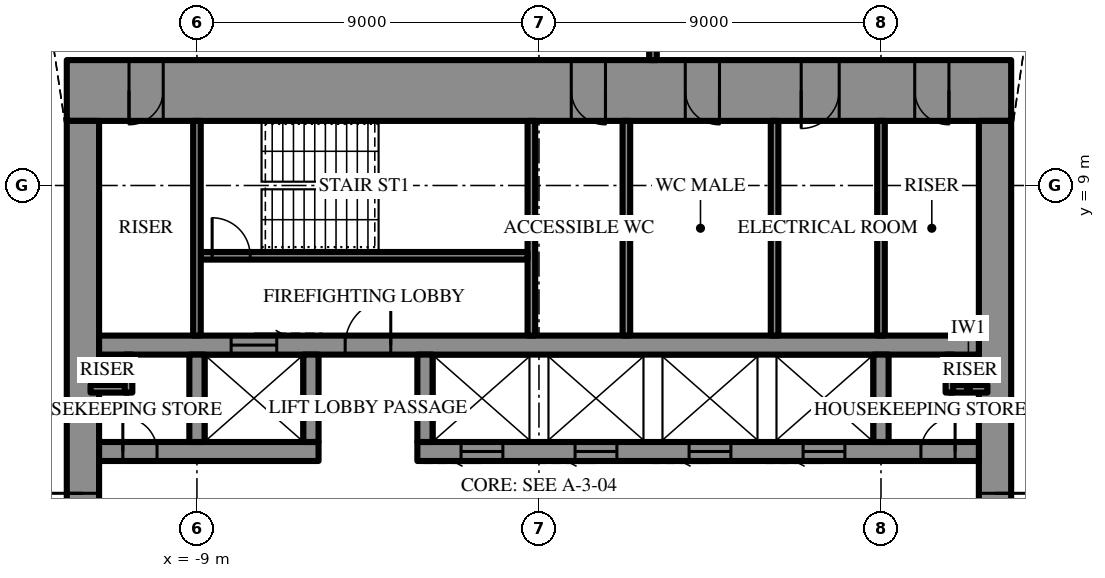
"""IFC4 building model, lengths in metres.
Left out: names, types, materials, properties, quantities, classifications, styles, units other than length and angle.
Written with IfcOpenShell. Run it as: python <this file> out.ifc"""

import sys

from ifc_helpers import new_model, si_unit, direction, frame, frame_2d, origin, place, context, subcontext, project, spatial, rectangle, extrude, element, fill, save


model = new_model("IFC4")
c1 = context("Model", 3, precision=1e-05, world=origin(), true_north=direction((0.0, 1.0)))
c2 = subcontext(c1, "Body", "Model", "MODEL_VIEW")
j1 = project(units=[si_unit("LENGTHUNIT", "METRE"), si_unit("PLANEANGLEUNIT", "RADIAN")], contexts=[c1])
p1 = place(None, origin())
s1 = spatial("IfcSite", under=j1, at=p1, CompositionType="ELEMENT")
p2 = place(p1, origin())
s2 = spatial("IfcBuilding", under=s1, at=p2, CompositionType="ELEMENT")
p3 = place(p2, frame((0.0, 0.0, 374.5)))
s3 = spatial("IfcBuildingStorey", under=s2, at=p3, CompositionType="ELEMENT", Elevation=374.5)
p4 = place(p3, frame((-12.425, 11.5, 0.0), z_axis=(0.0, 0.0, 1.0), x_axis=(1.0, 0.0, 0.0)))
e1 = element("IfcWall", 1, at=p4, inside=s3, PredefinedType="SHEAR", context=c2, shape_type="SweptSolid", body=[
    extrude(rectangle(XDim=24.85, YDim=1.6, at=frame_2d((12.425, 0.0))), origin(), (0.0, 0.0, 1.0), 4.2),
])
p5 = place(p4, frame((13.275, 0.0, 0.0)))
e2 = element("IfcOpeningElement", 2, at=p5, cuts=e1, PredefinedType="OPENING", context=c2, shape_type="SweptSolid", body=[
    extrude(rectangle(XDim=0.9, YDim=2.2, at=frame_2d((0.45, 1.1))), frame((0.0, 0.81, 0.0), z_axis=(0.0, -1.0, 0.0), x_axis=(1.0, 0.0, 0.0)), (0.0, 0.0, 1.0), 1.62),
])
p6 = place(p4, frame((16.275, 0.0, 0.0)))
e3 = element("IfcOpeningElement", 3, at=p6, cuts=e1, PredefinedType="OPENING", context=c2, shape_type="SweptSolid", body=[
    extrude(rectangle(XDim=0.9, YDim=2.2, at=frame_2d((0.45, 1.1))), frame((0.0, 0.81, 0.0), z_axis=(0.0, -1.0, 0.0), x_axis=(1.0, 0.0, 0.0)), (0.0, 0.0, 1.0), 1.62),
])
p7 = place(p4, frame((19.325, 0.0, 0.0)))
e4 = element("IfcOpeningElement", 4, at=p7, cuts=e1, PredefinedType="OPENING", context=c2, shape_type="SweptSolid", body=[
    extrude(rectangle(XDim=1.0, YDim=2.2, at=frame_2d((0.5, 1.1))), frame((0.0, 0.81, 0.0), z_axis=(0.0, -1.0, 0.0), x_axis=(1.0, 0.0, 0.0)), (0.0, 0.0, 1.0), 1.62),
])
p8 = place(p4, frame((1.637, 0.0, 0.0)))
e5 = element("IfcOpeningElement", 5, at=p8, cuts=e1, PredefinedType="OPENING", context=c2, shape_type="SweptSolid", body=[
    extrude(rectangle(XDim=0.9, YDim=2.2, at=frame_2d((0.45, 1.1))), frame((0.0, 0.81, 0.0), z_axis=(0.0, -1.0, 0.0), x_axis=(1.0, 0.0, 0.0)), (0.0, 0.0, 1.0), 1.62),
])
p9 = place(p4, frame((22.312, 0.0, 0.0)))
e6 = element("IfcOpeningElement", 6, at=p9, cuts=e1, PredefinedType="OPENING", context=c2, shape_type="SweptSolid", body=[
    extrude(rectangle(XDim=0.9, YDim=2.2, at=frame_2d((0.45, 1.1))), frame((0.0, 0.81, 0.0), z_axis=(0.0, -1.0, 0.0), x_axis=(1.0, 0.0, 0.0)), (0.0, 0.0, 1.0), 1.62),
])
p10 = place(p3, frame((12.0, -10.7, 0.0), z_axis=(0.0, 0.0, 1.0), x_axis=(0.0, 1.0, 0.0)))
e7 = element("IfcWall", 7, at=p10, inside=s3, PredefinedType="SHEAR", context=c2, shape_type="SweptSolid", body=[
    extrude(rectangle(XDim=21.4, YDim=0.85, at=frame_2d((10.7, 0.0))), origin(), (0.0, 0.0, 1.0), 4.2),
])
p11 = place(p10, frame((9.8, 0.0, 0.0)))
e8 = element("IfcOpeningElement", 8, at=p11, cuts=e7, PredefinedType="OPENING", context=c2, shape_type="SweptSolid", body=[
    extrude(rectangle(XDim=1.8, YDim=2.4, at=frame_2d((0.9, 1.2))), frame((0.0, 0.435, 0.0), z_axis=(0.0, -1.0, 0.0), x_axis=(1.0, 0.0, 0.0)), (0.0, 0.0, 1.0), 0.87),
])
p12 = place(p3, frame((-12.0, 10.7, 0.0), z_axis=(0.0, 0.0, 1.0), x_axis=(0.0, -1.0, 0.0)))
e9 = element("IfcWall", 9, at=p12, inside=s3, PredefinedType="SHEAR", context=c2, shape_type="SweptSolid", body=[
    extrude(rectangle(XDim=21.4, YDim=0.85, at=frame_2d((10.7, 0.0))), origin(), (0.0, 0.0, 1.0), 4.2),
])
p13 = place(p12, frame((9.8, 0.0, 0.0)))
e10 = element("IfcOpeningElement", 10, at=p13, cuts=e9, PredefinedType="OPENING", context=c2, shape_type="SweptSolid", body=[
    extrude(rectangle(XDim=1.8, YDim=2.4, at=frame_2d((0.9, 1.2))), frame((0.0, 0.435, 0.0), z_axis=(0.0, -1.0, 0.0), x_axis=(1.0, 0.0, 0.0)), (0.0, 0.0, 1.0), 0.87),
])
p14 = place(p3, frame((-11.575, 2.0, 0.0), z_axis=(0.0, 0.0, 1.0), x_axis=(1.0, 0.0, 0.0)))
e11 = element("IfcWall", 11, at=p14, inside=s3, PredefinedType="SHEAR", context=c2, shape_type="SweptSolid", body=[
    extrude(rectangle(XDim=5.775, YDim=0.5, at=frame_2d((2.887, 0.0))), origin(), (0.0, 0.0, 1.0), 4.2),
])
p15 = place(p14, frame((0.625, 0.0, 0.0)))
e12 = element("IfcOpeningElement", 12, at=p15, cuts=e11, PredefinedType="OPENING", context=c2, shape_type="SweptSolid", body=[
    extrude(rectangle(XDim=0.9, YDim=2.2, at=frame_2d((0.45, 1.1))), frame((0.0, 0.26, 0.0), z_axis=(0.0, -1.0, 0.0), x_axis=(1.0, 0.0, 0.0)), (0.0, 0.0, 1.0), 0.52),
])
p16 = place(p3, frame((-3.2, 2.0, 0.0), z_axis=(0.0, 0.0, 1.0), x_axis=(1.0, 0.0, 0.0)))
e13 = element("IfcWall", 13, at=p16, inside=s3, PredefinedType="SHEAR", context=c2, shape_type="SweptSolid", body=[
    extrude(rectangle(XDim=14.775, YDim=0.5, at=frame_2d((7.387, 0.0))), origin(), (0.0, 0.0, 1.0), 4.2),
])
p17 = place(p16, frame((13.25, 0.0, 0.0)))
e14 = element("IfcOpeningElement", 14, at=p17, cuts=e13, PredefinedType="OPENING", context=c2, shape_type="SweptSolid", body=[
    extrude(rectangle(XDim=0.9, YDim=2.2, at=frame_2d((0.45, 1.1))), frame((0.0, 0.26, 0.0), z_axis=(0.0, -1.0, 0.0), x_axis=(1.0, 0.0, 0.0)), (0.0, 0.0, 1.0), 0.52),
])
p18 = place(p16, frame((1.15, 0.0, 0.0)))
e15 = element("IfcOpeningElement", 15, at=p18, cuts=e13, PredefinedType="OPENING", context=c2, shape_type="SweptSolid", body=[
    extrude(rectangle(XDim=1.1, YDim=2.2, at=frame_2d((0.55, 1.1))), frame((0.0, 0.26, 0.0), z_axis=(0.0, -1.0, 0.0), x_axis=(1.0, 0.0, 0.0)), (0.0, 0.0, 1.0), 0.52),
])
p19 = place(p16, frame((4.15, 0.0, 0.0)))
e16 = element("IfcOpeningElement", 16, at=p19, cuts=e13, PredefinedType="OPENING", context=c2, shape_type="SweptSolid", body=[
    extrude(rectangle(XDim=1.1, YDim=2.2, at=frame_2d((0.55, 1.1))), frame((0.0, 0.26, 0.0), z_axis=(0.0, -1.0, 0.0), x_axis=(1.0, 0.0, 0.0)), (0.0, 0.0, 1.0), 0.52),
])
p20 = place(p16, frame((7.15, 0.0, 0.0)))
e17 = element("IfcOpeningElement", 17, at=p20, cuts=e13, PredefinedType="OPENING", context=c2, shape_type="SweptSolid", body=[
    extrude(rectangle(XDim=1.1, YDim=2.2, at=frame_2d((0.55, 1.1))), frame((0.0, 0.26, 0.0), z_axis=(0.0, -1.0, 0.0), x_axis=(1.0, 0.0, 0.0)), (0.0, 0.0, 1.0), 0.52),
])
p21 = place(p16, frame((10.15, 0.0, 0.0)))
e18 = element("IfcOpeningElement", 18, at=p21, cuts=e13, PredefinedType="OPENING", context=c2, shape_type="SweptSolid", body=[
    extrude(rectangle(XDim=1.1, YDim=2.2, at=frame_2d((0.55, 1.1))), frame((0.0, 0.26, 0.0), z_axis=(0.0, -1.0, 0.0), x_axis=(1.0, 0.0, 0.0)), (0.0, 0.0, 1.0), 0.52),
])
p22 = place(p3, frame((-11.575, 4.8, 0.0), z_axis=(0.0, 0.0, 1.0), x_axis=(1.0, 0.0, 0.0)))
e19 = element("IfcWall", 19, at=p22, inside=s3, PredefinedType="SHEAR", context=c2, shape_type="SweptSolid", body=[
    extrude(rectangle(XDim=23.15, YDim=0.5, at=frame_2d((11.575, 0.0))), origin(), (0.0, 0.0, 1.0), 4.2),
])
p23 = place(p22, frame((6.475, 0.0, 0.0)))
e20 = element("IfcOpeningElement", 20, at=p23, cuts=e19, PredefinedType="OPENING", context=c2, shape_type="SweptSolid", body=[
    extrude(rectangle(XDim=1.2, YDim=2.2, at=frame_2d((0.6, 1.1))), frame((0.0, 0.26, 0.0), z_axis=(0.0, -1.0, 0.0), x_axis=(1.0, 0.0, 0.0)), (0.0, 0.0, 1.0), 0.52),
])
p24 = place(p22, frame((3.475, 0.0, 0.0)))
e21 = element("IfcOpeningElement", 21, at=p24, cuts=e19, PredefinedType="OPENING", context=c2, shape_type="SweptSolid", body=[
    extrude(rectangle(XDim=1.2, YDim=2.2, at=frame_2d((0.6, 1.1))), frame((0.0, 0.26, 0.0), z_axis=(0.0, -1.0, 0.0), x_axis=(1.0, 0.0, 0.0)), (0.0, 0.0, 1.0), 0.52),
])
for number, where, z_axis, x_axis in (
    (22, (-9.0, 2.25, 0.0), (0.0, 0.0, 1.0), (0.0, 1.0, 0.0)),
    (23, (-6.0, 2.25, 0.0), (0.0, 0.0, 1.0), (0.0, 1.0, 0.0)),
    (24, (-3.0, 2.25, 0.0), (0.0, 0.0, 1.0), (0.0, 1.0, 0.0)),
    (25, (9.0, 2.25, 0.0), (0.0, 0.0, 1.0), (0.0, 1.0, 0.0)),
):
    element("IfcWall", number, at=place(p3, frame(where, z_axis=z_axis, x_axis=x_axis)), inside=s3, PredefinedType="SHEAR", context=c2, shape_type="SweptSolid", body=[
        extrude(rectangle(XDim=2.3, YDim=0.4, at=frame_2d((1.15, 0.0))), origin(), (0.0, 0.0, 1.0), 4.2),
    ])
p25 = place(p3, frame((-0.2, 5.05, 0.0), z_axis=(0.0, 0.0, 1.0), x_axis=(0.0, 1.0, 0.0)))
e26 = element("IfcWall", 26, at=p25, inside=s3, PredefinedType="SHEAR", context=c2, shape_type="SweptSolid", body=[
    extrude(rectangle(XDim=5.65, YDim=0.2, at=frame_2d((2.825, 0.0))), origin(), (0.0, 0.0, 1.0), 4.2),
])
p26 = place(p3, frame((-8.9, 7.15, 0.0), z_axis=(0.0, 0.0, 1.0), x_axis=(1.0, 0.0, 0.0)))
e27 = element("IfcWall", 27, at=p26, inside=s3, PredefinedType="SHEAR", context=c2, shape_type="SweptSolid", body=[
    extrude(rectangle(XDim=8.6, YDim=0.2, at=frame_2d((4.3, 0.0))), origin(), (0.0, 0.0, 1.0), 4.2),
])
p27 = place(p26, frame((0.3, 0.0, 0.0)))
e28 = element("IfcOpeningElement", 28, at=p27, cuts=e27, PredefinedType="OPENING", context=c2, shape_type="SweptSolid", body=[
    extrude(rectangle(XDim=1.0, YDim=2.2, at=frame_2d((0.5, 1.1))), frame((0.0, 0.11, 0.0), z_axis=(0.0, -1.0, 0.0), x_axis=(1.0, 0.0, 0.0)), (0.0, 0.0, 1.0), 0.22),
])
for number, where, z_axis, x_axis in (
    (29, (-9.0, 5.05, 0.0), (0.0, 0.0, 1.0), (0.0, 1.0, 0.0)),
    (30, (9.0, 5.05, 0.0), (0.0, 0.0, 1.0), (0.0, 1.0, 0.0)),
    (31, (2.3, 5.05, 0.0), (0.0, 0.0, 1.0), (0.0, 1.0, 0.0)),
    (32, (6.2, 5.05, 0.0), (0.0, 0.0, 1.0), (0.0, 1.0, 0.0)),
):
    element("IfcWall", number, at=place(p3, frame(where, z_axis=z_axis, x_axis=x_axis)), inside=s3, PredefinedType="PARTITIONING", context=c2, shape_type="SweptSolid", body=[
        extrude(rectangle(XDim=5.65, YDim=0.2, at=frame_2d((2.825, 0.0))), origin(), (0.0, 0.0, 1.0), 4.0),
    ])
for number, where, z_axis, x_axis in (
    (33, (-11.8, 3.65, 0.0), (0.0, 0.0, 1.0), (1.0, 0.0, 0.0)),
    (34, (-10.8, 3.55, 0.0), (0.0, 0.0, 1.0), (0.0, 1.0, 0.0)),
    (35, (10.8, 3.65, 0.0), (0.0, 0.0, 1.0), (1.0, 0.0, 0.0)),
    (36, (10.8, 3.55, 0.0), (0.0, 0.0, 1.0), (0.0, 1.0, 0.0)),
):
    element("IfcWall", number, at=place(p3, frame(where, z_axis=z_axis, x_axis=x_axis)), inside=s3, PredefinedType="PARTITIONING", context=c2, shape_type="SweptSolid", body=[
        extrude(rectangle(XDim=1.0, YDim=0.2, at=frame_2d((0.5, 0.0))), origin(), (0.0, 0.0, 1.0), 4.0),
    ])
p28 = place(p3, frame((3.0, 12.3, 0.0), z_axis=(0.0, 0.0, 1.0), x_axis=(0.0, 1.0, 0.0)))
e37 = element("IfcWall", 37, at=p28, inside=s3, PredefinedType="PARTITIONING", context=c2, shape_type="SweptSolid", body=[
    extrude(rectangle(XDim=1.7, YDim=0.2, at=frame_2d((0.85, 0.0))), origin(), (0.0, 0.0, 1.0), 4.0),
])
p29 = place(p28, frame((0.35, 0.0, 0.0)))
e38 = element("IfcOpeningElement", 38, at=p29, cuts=e37, PredefinedType="OPENING", context=c2, shape_type="SweptSolid", body=[
    extrude(rectangle(XDim=1.0, YDim=2.2, at=frame_2d((0.5, 1.1))), frame((0.0, 0.11, 0.0), z_axis=(0.0, -1.0, 0.0), x_axis=(1.0, 0.0, 0.0)), (0.0, 0.0, 1.0), 0.22),
])
p30 = place(p11, frame((1.8, 0.0, 0.0), z_axis=(0.0, 0.0, 1.0), x_axis=(-1.0, 0.0, 0.0)))
e39 = element("IfcDoor", 39, at=p30, inside=s3, OperationType="DOUBLE_DOOR_SINGLE_SWING", PredefinedType="DOOR", context=c2, shape_type="SweptSolid", body=[
    extrude(rectangle(XDim=1.8, YDim=2.4, at=frame_2d((0.9, 1.2))), frame((0.0, 0.025, 0.0), z_axis=(0.0, -1.0, 0.0), x_axis=(1.0, 0.0, 0.0)), (0.0, 0.0, 1.0), 0.05),
])
fill(e8, e39)
p31 = place(p13, frame((1.8, 0.0, 0.0), z_axis=(0.0, 0.0, 1.0), x_axis=(-1.0, 0.0, 0.0)))
e40 = element("IfcDoor", 40, at=p31, inside=s3, OperationType="DOUBLE_DOOR_SINGLE_SWING", PredefinedType="DOOR", context=c2, shape_type="SweptSolid", body=[
    extrude(rectangle(XDim=1.8, YDim=2.4, at=frame_2d((0.9, 1.2))), frame((0.0, 0.025, 0.0), z_axis=(0.0, -1.0, 0.0), x_axis=(1.0, 0.0, 0.0)), (0.0, 0.0, 1.0), 0.05),
])
fill(e10, e40)
p32 = place(p23, origin())
e41 = element("IfcDoor", 41, at=p32, inside=s3, OperationType="SINGLE_SWING_LEFT", PredefinedType="DOOR", context=c2, shape_type="SweptSolid", body=[
    extrude(rectangle(XDim=1.2, YDim=2.2, at=frame_2d((0.6, 1.1))), frame((0.0, 0.025, 0.0), z_axis=(0.0, -1.0, 0.0), x_axis=(1.0, 0.0, 0.0)), (0.0, 0.0, 1.0), 0.05),
])
fill(e20, e41)
p33 = place(p27, origin())
e42 = element("IfcDoor", 42, at=p33, inside=s3, OperationType="SINGLE_SWING_RIGHT", PredefinedType="DOOR", context=c2, shape_type="SweptSolid", body=[
    extrude(rectangle(XDim=1.0, YDim=2.2, at=frame_2d((0.5, 1.1))), frame((0.0, 0.025, 0.0), z_axis=(0.0, -1.0, 0.0), x_axis=(1.0, 0.0, 0.0)), (0.0, 0.0, 1.0), 0.05),
])
fill(e28, e42)
p34 = place(p5, frame((0.9, 0.0, 0.0), z_axis=(0.0, 0.0, 1.0), x_axis=(-1.0, 0.0, 0.0)))
e43 = element("IfcDoor", 43, at=p34, inside=s3, OperationType="SINGLE_SWING_RIGHT", PredefinedType="DOOR", context=c2, shape_type="SweptSolid", body=[
    extrude(rectangle(XDim=0.9, YDim=2.2, at=frame_2d((0.45, 1.1))), frame((0.0, 0.025, 0.0), z_axis=(0.0, -1.0, 0.0), x_axis=(1.0, 0.0, 0.0)), (0.0, 0.0, 1.0), 0.05),
])
fill(e2, e43)
p35 = place(p6, frame((0.9, 0.0, 0.0), z_axis=(0.0, 0.0, 1.0), x_axis=(-1.0, 0.0, 0.0)))
e44 = element("IfcDoor", 44, at=p35, inside=s3, OperationType="SINGLE_SWING_RIGHT", PredefinedType="DOOR", context=c2, shape_type="SweptSolid", body=[
    extrude(rectangle(XDim=0.9, YDim=2.2, at=frame_2d((0.45, 1.1))), frame((0.0, 0.025, 0.0), z_axis=(0.0, -1.0, 0.0), x_axis=(1.0, 0.0, 0.0)), (0.0, 0.0, 1.0), 0.05),
])
fill(e3, e44)
p36 = place(p7, frame((1.0, 0.0, 0.0), z_axis=(0.0, 0.0, 1.0), x_axis=(-1.0, 0.0, 0.0)))
e45 = element("IfcDoor", 45, at=p36, inside=s3, OperationType="SINGLE_SWING_LEFT", PredefinedType="DOOR", context=c2, shape_type="SweptSolid", body=[
    extrude(rectangle(XDim=1.0, YDim=2.2, at=frame_2d((0.5, 1.1))), frame((0.0, 0.025, 0.0), z_axis=(0.0, -1.0, 0.0), x_axis=(1.0, 0.0, 0.0)), (0.0, 0.0, 1.0), 0.05),
])
fill(e4, e45)
p37 = place(p8, frame((0.9, 0.0, 0.0), z_axis=(0.0, 0.0, 1.0), x_axis=(-1.0, 0.0, 0.0)))
e46 = element("IfcDoor", 46, at=p37, inside=s3, OperationType="SINGLE_SWING_LEFT", PredefinedType="DOOR", context=c2, shape_type="SweptSolid", body=[
    extrude(rectangle(XDim=0.9, YDim=2.2, at=frame_2d((0.45, 1.1))), frame((0.0, 0.025, 0.0), z_axis=(0.0, -1.0, 0.0), x_axis=(1.0, 0.0, 0.0)), (0.0, 0.0, 1.0), 0.05),
])
fill(e5, e46)
p38 = place(p9, frame((0.9, 0.0, 0.0), z_axis=(0.0, 0.0, 1.0), x_axis=(-1.0, 0.0, 0.0)))
e47 = element("IfcDoor", 47, at=p38, inside=s3, OperationType="SINGLE_SWING_RIGHT", PredefinedType="DOOR", context=c2, shape_type="SweptSolid", body=[
    extrude(rectangle(XDim=0.9, YDim=2.2, at=frame_2d((0.45, 1.1))), frame((0.0, 0.025, 0.0), z_axis=(0.0, -1.0, 0.0), x_axis=(1.0, 0.0, 0.0)), (0.0, 0.0, 1.0), 0.05),
])
fill(e6, e47)
p39 = place(p15, origin())
e48 = element("IfcDoor", 48, at=p39, inside=s3, OperationType="SINGLE_SWING_RIGHT", PredefinedType="DOOR", context=c2, shape_type="SweptSolid", body=[
    extrude(rectangle(XDim=0.9, YDim=2.2, at=frame_2d((0.45, 1.1))), frame((0.0, 0.025, 0.0), z_axis=(0.0, -1.0, 0.0), x_axis=(1.0, 0.0, 0.0)), (0.0, 0.0, 1.0), 0.05),
])
fill(e12, e48)
p40 = place(p17, origin())
e49 = element("IfcDoor", 49, at=p40, inside=s3, OperationType="SINGLE_SWING_LEFT", PredefinedType="DOOR", context=c2, shape_type="SweptSolid", body=[
    extrude(rectangle(XDim=0.9, YDim=2.2, at=frame_2d((0.45, 1.1))), frame((0.0, 0.025, 0.0), z_axis=(0.0, -1.0, 0.0), x_axis=(1.0, 0.0, 0.0)), (0.0, 0.0, 1.0), 0.05),
])
fill(e14, e49)
p41 = place(p24, origin())
e50 = element("IfcDoor", 50, at=p41, inside=s3, OperationType="SLIDING_TO_LEFT", PredefinedType="DOOR", context=c2, shape_type="SweptSolid", body=[
    extrude(rectangle(XDim=1.2, YDim=2.2, at=frame_2d((0.6, 1.1))), frame((0.0, 0.025, 0.0), z_axis=(0.0, -1.0, 0.0), x_axis=(1.0, 0.0, 0.0)), (0.0, 0.0, 1.0), 0.05),
])
fill(e21, e50)
p42 = place(p18, frame((1.1, 0.0, 0.0), z_axis=(0.0, 0.0, 1.0), x_axis=(-1.0, 0.0, 0.0)))
e51 = element("IfcDoor", 51, at=p42, inside=s3, OperationType="SLIDING_TO_LEFT", PredefinedType="DOOR", context=c2, shape_type="SweptSolid", body=[
    extrude(rectangle(XDim=1.1, YDim=2.2, at=frame_2d((0.55, 1.1))), frame((0.0, 0.025, 0.0), z_axis=(0.0, -1.0, 0.0), x_axis=(1.0, 0.0, 0.0)), (0.0, 0.0, 1.0), 0.05),
])
fill(e15, e51)
p43 = place(p19, frame((1.1, 0.0, 0.0), z_axis=(0.0, 0.0, 1.0), x_axis=(-1.0, 0.0, 0.0)))
e52 = element("IfcDoor", 52, at=p43, inside=s3, OperationType="SLIDING_TO_LEFT", PredefinedType="DOOR", context=c2, shape_type="SweptSolid", body=[
    extrude(rectangle(XDim=1.1, YDim=2.2, at=frame_2d((0.55, 1.1))), frame((0.0, 0.025, 0.0), z_axis=(0.0, -1.0, 0.0), x_axis=(1.0, 0.0, 0.0)), (0.0, 0.0, 1.0), 0.05),
])
fill(e16, e52)
p44 = place(p20, frame((1.1, 0.0, 0.0), z_axis=(0.0, 0.0, 1.0), x_axis=(-1.0, 0.0, 0.0)))
e53 = element("IfcDoor", 53, at=p44, inside=s3, OperationType="SLIDING_TO_LEFT", PredefinedType="DOOR", context=c2, shape_type="SweptSolid", body=[
    extrude(rectangle(XDim=1.1, YDim=2.2, at=frame_2d((0.55, 1.1))), frame((0.0, 0.025, 0.0), z_axis=(0.0, -1.0, 0.0), x_axis=(1.0, 0.0, 0.0)), (0.0, 0.0, 1.0), 0.05),
])
fill(e17, e53)
p45 = place(p21, frame((1.1, 0.0, 0.0), z_axis=(0.0, 0.0, 1.0), x_axis=(-1.0, 0.0, 0.0)))
e54 = element("IfcDoor", 54, at=p45, inside=s3, OperationType="SLIDING_TO_LEFT", PredefinedType="DOOR", context=c2, shape_type="SweptSolid", body=[
    extrude(rectangle(XDim=1.1, YDim=2.2, at=frame_2d((0.55, 1.1))), frame((0.0, 0.025, 0.0), z_axis=(0.0, -1.0, 0.0), x_axis=(1.0, 0.0, 0.0)), (0.0, 0.0, 1.0), 0.05),
])
fill(e18, e54)
save(model, sys.argv[1])
